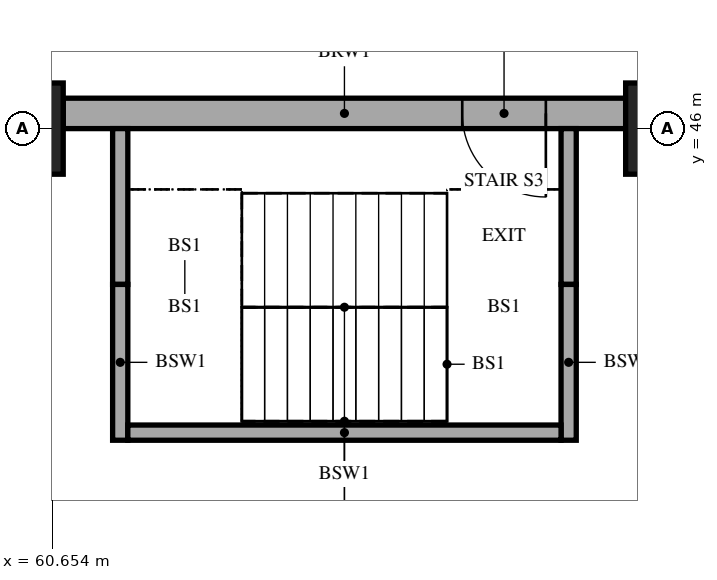
"""IFC4 building model, lengths in metres.
Left out: names, types, materials, properties, quantities, classifications, styles, units other than length and angle.
Written with IfcOpenShell. Run it as: python <this file> out.ifc"""

import sys

from ifc_helpers import new_model, si_unit, direction, frame, frame_2d, origin, origin_2d, place, context, subcontext, project, spatial, rectangle, extrude, element, fill, save


model = new_model("IFC4")
c1 = context("Model", 3, precision=1e-05, world=origin(), true_north=direction((0.0, 1.0)))
c2 = subcontext(c1, "Body", "Model", "MODEL_VIEW")
j1 = project(units=[si_unit("LENGTHUNIT", "METRE"), si_unit("PLANEANGLEUNIT", "RADIAN")], contexts=[c1])
p1 = place(None, origin())
s1 = spatial("IfcSite", under=j1, at=p1, CompositionType="ELEMENT")
p2 = place(p1, origin())
s2 = spatial("IfcBuilding", under=s1, at=p2, CompositionType="ELEMENT")
p3 = place(p2, frame((0.0, 0.0, -4.2)))
s3 = spatial("IfcBuildingStorey", under=s2, at=p3, CompositionType="ELEMENT", Elevation=-4.2)
for number, where, z_axis, x_axis in (
    (1, (60.0, 46.0, 0.0), (0.0, 0.0, 1.0), (1.0, 0.0, 0.0)),
    (2, (69.0, 46.0, 0.0), (0.0, 0.0, 1.0), (1.0, 0.0, 0.0)),
):
    element("IfcColumn", number, at=place(p3, frame(where, z_axis=z_axis, x_axis=x_axis)), inside=s3, PredefinedType="COLUMN", context=c2, shape_type="SweptSolid", body=[
        extrude(rectangle(XDim=1.6, YDim=1.2, at=origin_2d()), origin(), (0.0, 0.0, 1.0), 4.2),
    ])
p4 = place(p3, frame((60.8, 46.2, 0.0), z_axis=(0.0, 0.0, 1.0), x_axis=(1.0, 0.0, 0.0)))
e3 = element("IfcWall", 3, at=p4, inside=s3, PredefinedType="SOLIDWALL", context=c2, shape_type="SweptSolid", body=[
    extrude(rectangle(XDim=7.4, YDim=0.4, at=frame_2d((3.7, 0.0))), origin(), (0.0, 0.0, 1.0), 4.2),
])
p5 = place(p4, frame((5.25, 0.0, 0.0)))
e4 = element("IfcOpeningElement", 4, at=p5, cuts=e3, PredefinedType="OPENING", context=c2, shape_type="SweptSolid", body=[
    extrude(rectangle(XDim=1.1, YDim=2.1, at=frame_2d((0.55, 1.05))), frame((0.0, 0.21, 0.0), z_axis=(0.0, -1.0, 0.0), x_axis=(1.0, 0.0, 0.0)), (0.0, 0.0, 1.0), 0.42),
])
for number, where, z_axis, x_axis in (
    (5, (61.55, 46.0, 0.0), (0.0, 0.0, 1.0), (0.0, -1.0, 0.0)),
    (6, (61.55, 43.95, 0.0), (0.0, 0.0, 1.0), (0.0, -1.0, 0.0)),
    (7, (67.45, 46.0, 0.0), (0.0, 0.0, 1.0), (0.0, -1.0, 0.0)),
    (8, (67.45, 43.95, 0.0), (0.0, 0.0, 1.0), (0.0, -1.0, 0.0)),
):
    element("IfcWall", number, at=place(p3, frame(where, z_axis=z_axis, x_axis=x_axis)), inside=s3, PredefinedType="SOLIDWALL", context=c2, shape_type="SweptSolid", body=[
        extrude(rectangle(XDim=2.05, YDim=0.2, at=frame_2d((1.025, 0.0))), origin(), (0.0, 0.0, 1.0), 4.2),
    ])
p6 = place(p3, frame((61.65, 42.0, 0.0), z_axis=(0.0, 0.0, 1.0), x_axis=(1.0, 0.0, 0.0)))
e9 = element("IfcWall", 9, at=p6, inside=s3, PredefinedType="SOLIDWALL", context=c2, shape_type="SweptSolid", body=[
    extrude(rectangle(XDim=5.7, YDim=0.2, at=frame_2d((2.85, 0.0))), origin(), (0.0, 0.0, 1.0), 4.2),
])
p7 = place(p5, frame((1.1, 0.0, 0.0), z_axis=(0.0, 0.0, 1.0), x_axis=(-1.0, 0.0, 0.0)))
e10 = element("IfcDoor", 10, at=p7, inside=s3, OperationType="SINGLE_SWING_LEFT", PredefinedType="DOOR", context=c2, shape_type="SweptSolid", body=[
    extrude(rectangle(XDim=1.1, YDim=2.1, at=frame_2d((0.55, 1.05))), frame((0.0, 0.025, 0.0), z_axis=(0.0, -1.0, 0.0), x_axis=(1.0, 0.0, 0.0)), (0.0, 0.0, 1.0), 0.05),
])
fill(e4, e10)
save(model, sys.argv[1])
